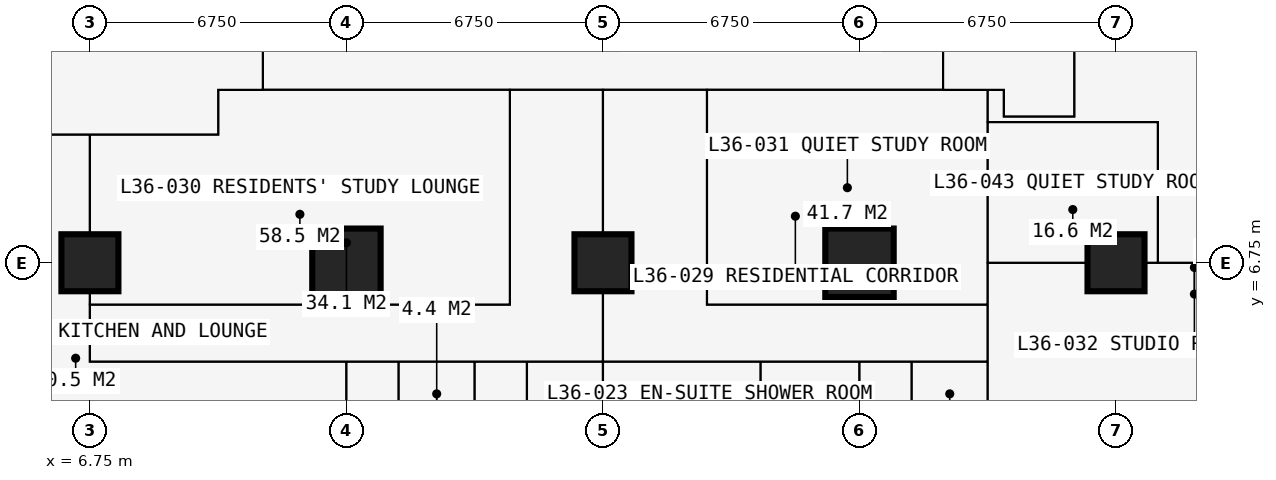
"""IFC4 building model, lengths in metres.
Left out: names, types, materials, properties, quantities, classifications, styles, units other than length and angle.
Written with IfcOpenShell. Run it as: python <this file> out.ifc"""

import sys

from ifc_helpers import new_model, si_unit, direction, frame, frame_2d, origin, origin_2d, place, context, subcontext, project, spatial, rectangle, extrude, element, fill, save


model = new_model("IFC4")
c1 = context("Model", 3, precision=1e-05, world=origin(), true_north=direction((0.0, 1.0)))
c2 = subcontext(c1, "Body", "Model", "MODEL_VIEW")
j1 = project(units=[si_unit("LENGTHUNIT", "METRE"), si_unit("PLANEANGLEUNIT", "RADIAN")], contexts=[c1])
p1 = place(None, origin())
s1 = spatial("IfcSite", under=j1, at=p1, CompositionType="ELEMENT")
p2 = place(p1, origin())
s2 = spatial("IfcBuilding", under=s1, at=p2, CompositionType="ELEMENT")
p3 = place(p2, frame((0.0, 0.0, 134.1)))
s3 = spatial("IfcBuildingStorey", under=s2, at=p3, CompositionType="ELEMENT", Elevation=134.1)
p4 = place(p3, frame((6.75, 6.75, 0.0), z_axis=(0.0, 0.0, 1.0), x_axis=(1.0, 0.0, 0.0)))
e1 = element("IfcColumn", 1, at=p4, inside=s3, PredefinedType="COLUMN", context=c2, shape_type="SweptSolid", body=[
    extrude(rectangle(XDim=1.5, YDim=1.5, at=origin_2d()), origin(), (0.0, 0.0, 1.0), 3.6),
])
p5 = place(p3, frame((13.5, 6.75, 0.0), z_axis=(0.0, 0.0, 1.0), x_axis=(1.0, 0.0, 0.0)))
e2 = element("IfcColumn", 2, at=p5, inside=s3, PredefinedType="COLUMN", context=c2, shape_type="SweptSolid", body=[
    extrude(rectangle(XDim=1.8, YDim=1.8, at=origin_2d()), origin(), (0.0, 0.0, 1.0), 3.6),
])
p6 = place(p3, frame((20.25, 6.75, 0.0), z_axis=(0.0, 0.0, 1.0), x_axis=(1.0, 0.0, 0.0)))
e3 = element("IfcColumn", 3, at=p6, inside=s3, PredefinedType="COLUMN", context=c2, shape_type="SweptSolid", body=[
    extrude(rectangle(XDim=1.5, YDim=1.5, at=origin_2d()), origin(), (0.0, 0.0, 1.0), 3.6),
])
p7 = place(p3, frame((27.0, 6.75, 0.0), z_axis=(0.0, 0.0, 1.0), x_axis=(1.0, 0.0, 0.0)))
e4 = element("IfcColumn", 4, at=p7, inside=s3, PredefinedType="COLUMN", context=c2, shape_type="SweptSolid", body=[
    extrude(rectangle(XDim=1.8, YDim=1.8, at=origin_2d()), origin(), (0.0, 0.0, 1.0), 3.6),
])
p8 = place(p3, frame((33.75, 6.75, 0.0), z_axis=(0.0, 0.0, 1.0), x_axis=(1.0, 0.0, 0.0)))
e5 = element("IfcColumn", 5, at=p8, inside=s3, PredefinedType="COLUMN", context=c2, shape_type="SweptSolid", body=[
    extrude(rectangle(XDim=1.5, YDim=1.5, at=origin_2d()), origin(), (0.0, 0.0, 1.0), 3.6),
])
p9 = place(p3, frame((-0.734, 10.125, 0.0), z_axis=(0.0, 0.0, 1.0), x_axis=(1.0, 0.0, 0.0)))
e6 = element("IfcWall", 6, at=p9, inside=s3, PredefinedType="PARTITIONING", context=c2, shape_type="SweptSolid", body=[
    extrude(rectangle(XDim=10.859, YDim=0.15, at=frame_2d((5.429, 0.0))), origin(), (0.0, 0.0, 1.0), 3.3),
])
p10 = place(p3, frame((6.75, 4.15, 0.0), z_axis=(0.0, 0.0, 1.0), x_axis=(0.0, 1.0, 0.0)))
e7 = element("IfcWall", 7, at=p10, inside=s3, PredefinedType="PARTITIONING", context=c2, shape_type="SweptSolid", body=[
    extrude(rectangle(XDim=5.975, YDim=0.15, at=frame_2d((2.988, 0.0))), origin(), (0.0, 0.0, 1.0), 2.802),
])
p11 = place(p3, frame((6.75, 4.15, 0.0), z_axis=(0.0, 0.0, 1.0), x_axis=(1.0, 0.0, 0.0)))
e8 = element("IfcWall", 8, at=p11, inside=s3, PredefinedType="PARTITIONING", context=c2, shape_type="SweptSolid", body=[
    extrude(rectangle(XDim=23.625, YDim=0.1, at=frame_2d((11.812, 0.0))), origin(), (0.0, 0.0, 1.0), 3.3),
])
p12 = place(p11, frame((2.85, 0.0, 0.0)))
e9 = element("IfcOpeningElement", 9, at=p12, cuts=e8, PredefinedType="OPENING", context=c2, shape_type="SweptSolid", body=[
    extrude(rectangle(XDim=1.0, YDim=2.2, at=frame_2d((0.5, 1.1))), frame((0.0, 0.06, 0.0), z_axis=(0.0, -1.0, 0.0), x_axis=(1.0, 0.0, 0.0)), (0.0, 0.0, 1.0), 0.12),
])
p13 = place(p11, frame((6.95, 0.0, 0.0)))
e10 = element("IfcOpeningElement", 10, at=p13, cuts=e8, PredefinedType="OPENING", context=c2, shape_type="SweptSolid", body=[
    extrude(rectangle(XDim=0.95, YDim=2.2, at=frame_2d((0.475, 1.1))), frame((0.0, 0.06, 0.0), z_axis=(0.0, -1.0, 0.0), x_axis=(1.0, 0.0, 0.0)), (0.0, 0.0, 1.0), 0.12),
])
p14 = place(p11, frame((10.375, 0.0, 0.0)))
e11 = element("IfcOpeningElement", 11, at=p14, cuts=e8, PredefinedType="OPENING", context=c2, shape_type="SweptSolid", body=[
    extrude(rectangle(XDim=0.95, YDim=2.2, at=frame_2d((0.475, 1.1))), frame((0.0, 0.06, 0.0), z_axis=(0.0, -1.0, 0.0), x_axis=(1.0, 0.0, 0.0)), (0.0, 0.0, 1.0), 0.12),
])
p15 = place(p11, frame((15.1, 0.0, 0.0)))
e12 = element("IfcOpeningElement", 12, at=p15, cuts=e8, PredefinedType="OPENING", context=c2, shape_type="SweptSolid", body=[
    extrude(rectangle(XDim=0.95, YDim=2.2, at=frame_2d((0.475, 1.1))), frame((0.0, 0.06, 0.0), z_axis=(0.0, -1.0, 0.0), x_axis=(1.0, 0.0, 0.0)), (0.0, 0.0, 1.0), 0.12),
])
p16 = place(p11, frame((20.5, 0.0, 0.0)))
e13 = element("IfcOpeningElement", 13, at=p16, cuts=e8, PredefinedType="OPENING", context=c2, shape_type="SweptSolid", body=[
    extrude(rectangle(XDim=0.95, YDim=2.2, at=frame_2d((0.475, 1.1))), frame((0.0, 0.06, 0.0), z_axis=(0.0, -1.0, 0.0), x_axis=(1.0, 0.0, 0.0)), (0.0, 0.0, 1.0), 0.12),
])
p17 = place(p3, frame((6.75, 5.65, 0.0), z_axis=(0.0, 0.0, 1.0), x_axis=(1.0, 0.0, 0.0)))
e14 = element("IfcWall", 14, at=p17, inside=s3, PredefinedType="PARTITIONING", context=c2, shape_type="SweptSolid", body=[
    extrude(rectangle(XDim=11.05, YDim=0.15, at=frame_2d((5.525, 0.0))), origin(), (0.0, 0.0, 1.0), 3.3),
])
p18 = place(p3, frame((10.125, 10.125, 0.0), z_axis=(0.0, 0.0, 1.0), x_axis=(0.0, 1.0, 0.0)))
e15 = element("IfcWall", 15, at=p18, inside=s3, PredefinedType="PARTITIONING", context=c2, shape_type="SweptSolid", body=[
    extrude(rectangle(XDim=1.175, YDim=0.15, at=frame_2d((0.587, 0.0))), origin(), (0.0, 0.0, 1.0), 3.3),
])
p19 = place(p3, frame((10.125, 11.3, 0.0), z_axis=(0.0, 0.0, 1.0), x_axis=(1.0, 0.0, 0.0)))
e16 = element("IfcWall", 16, at=p19, inside=s3, PredefinedType="PARTITIONING", context=c2, shape_type="SweptSolid", body=[
    extrude(rectangle(XDim=20.675, YDim=0.15, at=frame_2d((10.337, 0.0))), origin(), (0.0, 0.0, 1.0), 3.3),
])
p20 = place(p19, frame((8.375, 0.0, 0.0)))
e17 = element("IfcOpeningElement", 17, at=p20, cuts=e16, PredefinedType="OPENING", context=c2, shape_type="SweptSolid", body=[
    extrude(rectangle(XDim=1.0, YDim=2.2, at=frame_2d((0.5, 1.1))), frame((0.0, 0.085, 0.0), z_axis=(0.0, -1.0, 0.0), x_axis=(1.0, 0.0, 0.0)), (0.0, 0.0, 1.0), 0.17),
])
p21 = place(p19, frame((10.975, 0.0, 0.0)))
e18 = element("IfcOpeningElement", 18, at=p21, cuts=e16, PredefinedType="OPENING", context=c2, shape_type="SweptSolid", body=[
    extrude(rectangle(XDim=1.0, YDim=2.2, at=frame_2d((0.5, 1.1))), frame((0.0, 0.085, 0.0), z_axis=(0.0, -1.0, 0.0), x_axis=(1.0, 0.0, 0.0)), (0.0, 0.0, 1.0), 0.17),
])
p22 = place(p19, frame((3.925, 0.0, 0.0)))
e19 = element("IfcOpeningElement", 19, at=p22, cuts=e16, PredefinedType="OPENING", context=c2, shape_type="SweptSolid", body=[
    extrude(rectangle(XDim=0.95, YDim=2.2, at=frame_2d((0.475, 1.1))), frame((0.0, 0.085, 0.0), z_axis=(0.0, -1.0, 0.0), x_axis=(1.0, 0.0, 0.0)), (0.0, 0.0, 1.0), 0.17),
])
p23 = place(p3, frame((11.3, 11.3, 0.0), z_axis=(0.0, 0.0, 1.0), x_axis=(0.0, 1.0, 0.0)))
e20 = element("IfcWall", 20, at=p23, inside=s3, PredefinedType="PARTITIONING", context=c2, shape_type="SweptSolid", body=[
    extrude(rectangle(XDim=19.3, YDim=0.15, at=frame_2d((9.65, 0.0))), origin(), (0.0, 0.0, 1.0), 3.3),
])
p24 = place(p23, frame((13.525, 0.0, 0.0)))
e21 = element("IfcOpeningElement", 21, at=p24, cuts=e20, PredefinedType="OPENING", context=c2, shape_type="SweptSolid", body=[
    extrude(rectangle(XDim=1.0, YDim=2.2, at=frame_2d((0.5, 1.1))), frame((0.0, 0.085, 0.0), z_axis=(0.0, -1.0, 0.0), x_axis=(1.0, 0.0, 0.0)), (0.0, 0.0, 1.0), 0.17),
])
p25 = place(p23, frame((10.438, 0.0, 0.0)))
e22 = element("IfcOpeningElement", 22, at=p25, cuts=e20, PredefinedType="OPENING", context=c2, shape_type="SweptSolid", body=[
    extrude(rectangle(XDim=1.0, YDim=2.2, at=frame_2d((0.5, 1.1))), frame((0.0, 0.085, 0.0), z_axis=(0.0, -1.0, 0.0), x_axis=(1.0, 0.0, 0.0)), (0.0, 0.0, 1.0), 0.17),
])
p26 = place(p3, frame((13.5, -0.734, 0.0), z_axis=(0.0, 0.0, 1.0), x_axis=(0.0, 1.0, 0.0)))
e23 = element("IfcWall", 23, at=p26, inside=s3, PredefinedType="PARTITIONING", context=c2, shape_type="SweptSolid", body=[
    extrude(rectangle(XDim=4.884, YDim=0.15, at=frame_2d((2.442, 0.0))), origin(), (0.0, 0.0, 1.0), 2.802),
])
p27 = place(p3, frame((14.875, 1.95, 0.0), z_axis=(0.0, 0.0, 1.0), x_axis=(0.0, 1.0, 0.0)))
e24 = element("IfcWall", 24, at=p27, inside=s3, PredefinedType="PARTITIONING", context=c2, shape_type="SweptSolid", body=[
    extrude(rectangle(XDim=2.2, YDim=0.1, at=frame_2d((1.1, 0.0))), origin(), (0.0, 0.0, 1.0), 3.3),
])
p28 = place(p27, frame((0.65, 0.0, 0.0)))
e25 = element("IfcOpeningElement", 25, at=p28, cuts=e24, PredefinedType="OPENING", context=c2, shape_type="SweptSolid", body=[
    extrude(rectangle(XDim=0.9, YDim=2.2, at=frame_2d((0.45, 1.1))), frame((0.0, 0.06, 0.0), z_axis=(0.0, -1.0, 0.0), x_axis=(1.0, 0.0, 0.0)), (0.0, 0.0, 1.0), 0.12),
])
p29 = place(p3, frame((16.875, -0.734, 0.0), z_axis=(0.0, 0.0, 1.0), x_axis=(0.0, 1.0, 0.0)))
e26 = element("IfcWall", 26, at=p29, inside=s3, PredefinedType="PARTITIONING", context=c2, shape_type="SweptSolid", body=[
    extrude(rectangle(XDim=4.884, YDim=0.175, at=frame_2d((2.442, 0.0))), origin(), (0.0, 0.0, 1.0), 3.3),
])
p30 = place(p3, frame((17.8, 5.65, 0.0), z_axis=(0.0, 0.0, 1.0), x_axis=(0.0, 1.0, 0.0)))
e27 = element("IfcWall", 27, at=p30, inside=s3, PredefinedType="PARTITIONING", context=c2, shape_type="SweptSolid", body=[
    extrude(rectangle(XDim=5.65, YDim=0.15, at=frame_2d((2.825, 0.0))), origin(), (0.0, 0.0, 1.0), 3.3),
])
p31 = place(p3, frame((18.25, 1.95, 0.0), z_axis=(0.0, 0.0, 1.0), x_axis=(0.0, 1.0, 0.0)))
e28 = element("IfcWall", 28, at=p31, inside=s3, PredefinedType="PARTITIONING", context=c2, shape_type="SweptSolid", body=[
    extrude(rectangle(XDim=2.2, YDim=0.1, at=frame_2d((1.1, 0.0))), origin(), (0.0, 0.0, 1.0), 3.3),
])
p32 = place(p31, frame((0.65, 0.0, 0.0)))
e29 = element("IfcOpeningElement", 29, at=p32, cuts=e28, PredefinedType="OPENING", context=c2, shape_type="SweptSolid", body=[
    extrude(rectangle(XDim=0.9, YDim=2.2, at=frame_2d((0.45, 1.1))), frame((0.0, 0.06, 0.0), z_axis=(0.0, -1.0, 0.0), x_axis=(1.0, 0.0, 0.0)), (0.0, 0.0, 1.0), 0.12),
])
p33 = place(p3, frame((20.25, -0.734, 0.0), z_axis=(0.0, 0.0, 1.0), x_axis=(0.0, 1.0, 0.0)))
e30 = element("IfcWall", 30, at=p33, inside=s3, PredefinedType="PARTITIONING", context=c2, shape_type="SweptSolid", body=[
    extrude(rectangle(XDim=12.034, YDim=0.15, at=frame_2d((6.017, 0.0))), origin(), (0.0, 0.0, 1.0), 2.802),
])
p34 = place(p3, frame((22.988, 5.65, 0.0), z_axis=(0.0, 0.0, 1.0), x_axis=(1.0, 0.0, 0.0)))
e31 = element("IfcWall", 31, at=p34, inside=s3, PredefinedType="PARTITIONING", context=c2, shape_type="SweptSolid", body=[
    extrude(rectangle(XDim=7.387, YDim=0.15, at=frame_2d((3.694, 0.0))), origin(), (0.0, 0.0, 1.0), 3.3),
])
p35 = place(p34, frame((2.15, 0.0, 0.0)))
e32 = element("IfcOpeningElement", 32, at=p35, cuts=e31, PredefinedType="OPENING", context=c2, shape_type="SweptSolid", body=[
    extrude(rectangle(XDim=0.95, YDim=2.2, at=frame_2d((0.475, 1.1))), frame((0.0, 0.085, 0.0), z_axis=(0.0, -1.0, 0.0), x_axis=(1.0, 0.0, 0.0)), (0.0, 0.0, 1.0), 0.17),
])
p36 = place(p3, frame((22.988, 5.65, 0.0), z_axis=(0.0, 0.0, 1.0), x_axis=(0.0, 1.0, 0.0)))
e33 = element("IfcWall", 33, at=p36, inside=s3, PredefinedType="PARTITIONING", context=c2, shape_type="SweptSolid", body=[
    extrude(rectangle(XDim=5.65, YDim=0.15, at=frame_2d((2.825, 0.0))), origin(), (0.0, 0.0, 1.0), 3.3),
])
p37 = place(p3, frame((24.4, 1.75, 0.0), z_axis=(0.0, 0.0, 1.0), x_axis=(0.0, 1.0, 0.0)))
e34 = element("IfcWall", 34, at=p37, inside=s3, PredefinedType="PARTITIONING", context=c2, shape_type="SweptSolid", body=[
    extrude(rectangle(XDim=2.4, YDim=0.1, at=frame_2d((1.2, 0.0))), origin(), (0.0, 0.0, 1.0), 3.3),
])
p38 = place(p3, frame((27.0, -0.734, 0.0), z_axis=(0.0, 0.0, 1.0), x_axis=(0.0, 1.0, 0.0)))
e35 = element("IfcWall", 35, at=p38, inside=s3, PredefinedType="PARTITIONING", context=c2, shape_type="SweptSolid", body=[
    extrude(rectangle(XDim=4.884, YDim=0.175, at=frame_2d((2.442, 0.0))), origin(), (0.0, 0.0, 1.0), 2.802),
])
p39 = place(p3, frame((28.375, 1.95, 0.0), z_axis=(0.0, 0.0, 1.0), x_axis=(0.0, 1.0, 0.0)))
e36 = element("IfcWall", 36, at=p39, inside=s3, PredefinedType="PARTITIONING", context=c2, shape_type="SweptSolid", body=[
    extrude(rectangle(XDim=2.2, YDim=0.1, at=frame_2d((1.1, 0.0))), origin(), (0.0, 0.0, 1.0), 3.3),
])
p40 = place(p39, frame((0.65, 0.0, 0.0)))
e37 = element("IfcOpeningElement", 37, at=p40, cuts=e36, PredefinedType="OPENING", context=c2, shape_type="SweptSolid", body=[
    extrude(rectangle(XDim=0.9, YDim=2.2, at=frame_2d((0.45, 1.1))), frame((0.0, 0.06, 0.0), z_axis=(0.0, -1.0, 0.0), x_axis=(1.0, 0.0, 0.0)), (0.0, 0.0, 1.0), 0.12),
])
p41 = place(p3, frame((29.2, 11.3, 0.0), z_axis=(0.0, 0.0, 1.0), x_axis=(0.0, 1.0, 0.0)))
e38 = element("IfcWall", 38, at=p41, inside=s3, PredefinedType="PARTITIONING", context=c2, shape_type="SweptSolid", body=[
    extrude(rectangle(XDim=17.9, YDim=0.2, at=frame_2d((8.95, 0.0))), origin(), (0.0, 0.0, 1.0), 3.3),
])
p42 = place(p41, frame((8.35, 0.0, 0.0)))
e39 = element("IfcOpeningElement", 39, at=p42, cuts=e38, PredefinedType="OPENING", context=c2, shape_type="SweptSolid", body=[
    extrude(rectangle(XDim=1.2, YDim=2.2, at=frame_2d((0.6, 1.1))), frame((0.0, 0.11, 0.0), z_axis=(0.0, -1.0, 0.0), x_axis=(1.0, 0.0, 0.0)), (0.0, 0.0, 1.0), 0.22),
])
p43 = place(p3, frame((30.375, -0.734, 0.0), z_axis=(0.0, 0.0, 1.0), x_axis=(0.0, 1.0, 0.0)))
e40 = element("IfcWall", 40, at=p43, inside=s3, PredefinedType="PARTITIONING", context=c2, shape_type="SweptSolid", body=[
    extrude(rectangle(XDim=12.034, YDim=0.15, at=frame_2d((6.017, 0.0))), origin(), (0.0, 0.0, 1.0), 3.3),
])
p44 = place(p43, frame((5.134, 0.0, 0.0)))
e41 = element("IfcOpeningElement", 41, at=p44, cuts=e40, PredefinedType="OPENING", context=c2, shape_type="SweptSolid", body=[
    extrude(rectangle(XDim=1.0, YDim=2.2, at=frame_2d((0.5, 1.1))), frame((0.0, 0.085, 0.0), z_axis=(0.0, -1.0, 0.0), x_axis=(1.0, 0.0, 0.0)), (0.0, 0.0, 1.0), 0.17),
])
p45 = place(p3, frame((30.375, 6.75, 0.0), z_axis=(0.0, 0.0, 1.0), x_axis=(1.0, 0.0, 0.0)))
e42 = element("IfcWall", 42, at=p45, inside=s3, PredefinedType="PARTITIONING", context=c2, shape_type="SweptSolid", body=[
    extrude(rectangle(XDim=5.975, YDim=0.15, at=frame_2d((2.988, 0.0))), origin(), (0.0, 0.0, 1.0), 2.802),
])
p46 = place(p3, frame((30.375, 10.45, 0.0), z_axis=(0.0, 0.0, 1.0), x_axis=(1.0, 0.0, 0.0)))
e43 = element("IfcWall", 43, at=p46, inside=s3, PredefinedType="PARTITIONING", context=c2, shape_type="SweptSolid", body=[
    extrude(rectangle(XDim=4.475, YDim=0.15, at=frame_2d((2.238, 0.0))), origin(), (0.0, 0.0, 1.0), 3.3),
])
p47 = place(p46, frame((2.35, 0.0, 0.0)))
e44 = element("IfcOpeningElement", 44, at=p47, cuts=e43, PredefinedType="OPENING", context=c2, shape_type="SweptSolid", body=[
    extrude(rectangle(XDim=0.95, YDim=2.2, at=frame_2d((0.475, 1.1))), frame((0.0, 0.085, 0.0), z_axis=(0.0, -1.0, 0.0), x_axis=(1.0, 0.0, 0.0)), (0.0, 0.0, 1.0), 0.17),
])
p48 = place(p3, frame((30.8, 10.6, 0.0), z_axis=(0.0, 0.0, 1.0), x_axis=(0.0, 1.0, 0.0)))
e45 = element("IfcWall", 45, at=p48, inside=s3, PredefinedType="PARTITIONING", context=c2, shape_type="SweptSolid", body=[
    extrude(rectangle(XDim=0.7, YDim=0.15, at=frame_2d((0.35, 0.0))), origin(), (0.0, 0.0, 1.0), 3.3),
])
p49 = place(p3, frame((30.8, 10.6, 0.0), z_axis=(0.0, 0.0, 1.0), x_axis=(1.0, 0.0, 0.0)))
e46 = element("IfcWall", 46, at=p49, inside=s3, PredefinedType="PARTITIONING", context=c2, shape_type="SweptSolid", body=[
    extrude(rectangle(XDim=1.85, YDim=0.15, at=frame_2d((0.925, 0.0))), origin(), (0.0, 0.0, 1.0), 3.3),
])
p50 = place(p3, frame((32.65, 10.6, 0.0), z_axis=(0.0, 0.0, 1.0), x_axis=(0.0, 1.0, 0.0)))
e47 = element("IfcWall", 47, at=p50, inside=s3, PredefinedType="SHEAR", context=c2, shape_type="SweptSolid", body=[
    extrude(rectangle(XDim=9.3, YDim=0.1, at=frame_2d((4.65, 0.0))), origin(), (0.0, 0.0, 1.0), 3.3),
])
p51 = place(p50, frame((0.5, 0.0, 0.0)))
e48 = element("IfcOpeningElement", 48, at=p51, cuts=e47, PredefinedType="OPENING", context=c2, shape_type="SweptSolid", body=[
    extrude(rectangle(XDim=1.0, YDim=2.2, at=frame_2d((0.5, 1.1))), frame((0.0, 0.06, 0.0), z_axis=(0.0, -1.0, 0.0), x_axis=(1.0, 0.0, 0.0)), (0.0, 0.0, 1.0), 0.12),
])
p52 = place(p3, frame((34.85, 6.75, 0.0), z_axis=(0.0, 0.0, 1.0), x_axis=(0.0, 1.0, 0.0)))
e49 = element("IfcWall", 49, at=p52, inside=s3, PredefinedType="PARTITIONING", context=c2, shape_type="SweptSolid", body=[
    extrude(rectangle(XDim=3.7, YDim=0.15, at=frame_2d((1.85, 0.0))), origin(), (0.0, 0.0, 1.0), 3.3),
])
p53 = place(p12, origin())
e50 = element("IfcDoor", 50, at=p53, inside=s3, OperationType="SINGLE_SWING_LEFT", PredefinedType="DOOR", context=c2, shape_type="SweptSolid", body=[
    extrude(rectangle(XDim=1.0, YDim=2.2, at=frame_2d((0.5, 1.1))), frame((0.0, 0.025, 0.0), z_axis=(0.0, -1.0, 0.0), x_axis=(1.0, 0.0, 0.0)), (0.0, 0.0, 1.0), 0.05),
])
fill(e9, e50)
p54 = place(p13, origin())
e51 = element("IfcDoor", 51, at=p54, inside=s3, OperationType="SINGLE_SWING_LEFT", PredefinedType="DOOR", context=c2, shape_type="SweptSolid", body=[
    extrude(rectangle(XDim=0.95, YDim=2.2, at=frame_2d((0.475, 1.1))), frame((0.0, 0.025, 0.0), z_axis=(0.0, -1.0, 0.0), x_axis=(1.0, 0.0, 0.0)), (0.0, 0.0, 1.0), 0.05),
])
fill(e10, e51)
p55 = place(p28, origin())
e52 = element("IfcDoor", 52, at=p55, inside=s3, OperationType="SINGLE_SWING_RIGHT", PredefinedType="DOOR", context=c2, shape_type="SweptSolid", body=[
    extrude(rectangle(XDim=0.9, YDim=2.2, at=frame_2d((0.45, 1.1))), frame((0.0, 0.025, 0.0), z_axis=(0.0, -1.0, 0.0), x_axis=(1.0, 0.0, 0.0)), (0.0, 0.0, 1.0), 0.05),
])
fill(e25, e52)
p56 = place(p14, origin())
e53 = element("IfcDoor", 53, at=p56, inside=s3, OperationType="SINGLE_SWING_LEFT", PredefinedType="DOOR", context=c2, shape_type="SweptSolid", body=[
    extrude(rectangle(XDim=0.95, YDim=2.2, at=frame_2d((0.475, 1.1))), frame((0.0, 0.025, 0.0), z_axis=(0.0, -1.0, 0.0), x_axis=(1.0, 0.0, 0.0)), (0.0, 0.0, 1.0), 0.05),
])
fill(e11, e53)
p57 = place(p32, origin())
e54 = element("IfcDoor", 54, at=p57, inside=s3, OperationType="SINGLE_SWING_RIGHT", PredefinedType="DOOR", context=c2, shape_type="SweptSolid", body=[
    extrude(rectangle(XDim=0.9, YDim=2.2, at=frame_2d((0.45, 1.1))), frame((0.0, 0.025, 0.0), z_axis=(0.0, -1.0, 0.0), x_axis=(1.0, 0.0, 0.0)), (0.0, 0.0, 1.0), 0.05),
])
fill(e29, e54)
p58 = place(p20, origin())
e55 = element("IfcDoor", 55, at=p58, inside=s3, OperationType="SINGLE_SWING_LEFT", PredefinedType="DOOR", context=c2, shape_type="SweptSolid", body=[
    extrude(rectangle(XDim=1.0, YDim=2.2, at=frame_2d((0.5, 1.1))), frame((0.0, 0.025, 0.0), z_axis=(0.0, -1.0, 0.0), x_axis=(1.0, 0.0, 0.0)), (0.0, 0.0, 1.0), 0.05),
])
fill(e17, e55)
p59 = place(p15, origin())
e56 = element("IfcDoor", 56, at=p59, inside=s3, OperationType="SINGLE_SWING_LEFT", PredefinedType="DOOR", context=c2, shape_type="SweptSolid", body=[
    extrude(rectangle(XDim=0.95, YDim=2.2, at=frame_2d((0.475, 1.1))), frame((0.0, 0.025, 0.0), z_axis=(0.0, -1.0, 0.0), x_axis=(1.0, 0.0, 0.0)), (0.0, 0.0, 1.0), 0.05),
])
fill(e12, e56)
p60 = place(p16, origin())
e57 = element("IfcDoor", 57, at=p60, inside=s3, OperationType="SINGLE_SWING_LEFT", PredefinedType="DOOR", context=c2, shape_type="SweptSolid", body=[
    extrude(rectangle(XDim=0.95, YDim=2.2, at=frame_2d((0.475, 1.1))), frame((0.0, 0.025, 0.0), z_axis=(0.0, -1.0, 0.0), x_axis=(1.0, 0.0, 0.0)), (0.0, 0.0, 1.0), 0.05),
])
fill(e13, e57)
p61 = place(p40, origin())
e58 = element("IfcDoor", 58, at=p61, inside=s3, OperationType="SINGLE_SWING_RIGHT", PredefinedType="DOOR", context=c2, shape_type="SweptSolid", body=[
    extrude(rectangle(XDim=0.9, YDim=2.2, at=frame_2d((0.45, 1.1))), frame((0.0, 0.025, 0.0), z_axis=(0.0, -1.0, 0.0), x_axis=(1.0, 0.0, 0.0)), (0.0, 0.0, 1.0), 0.05),
])
fill(e37, e58)
p62 = place(p21, origin())
e59 = element("IfcDoor", 59, at=p62, inside=s3, OperationType="SINGLE_SWING_LEFT", PredefinedType="DOOR", context=c2, shape_type="SweptSolid", body=[
    extrude(rectangle(XDim=1.0, YDim=2.2, at=frame_2d((0.5, 1.1))), frame((0.0, 0.025, 0.0), z_axis=(0.0, -1.0, 0.0), x_axis=(1.0, 0.0, 0.0)), (0.0, 0.0, 1.0), 0.05),
])
fill(e18, e59)
p63 = place(p22, origin())
e60 = element("IfcDoor", 60, at=p63, inside=s3, OperationType="SINGLE_SWING_LEFT", PredefinedType="DOOR", context=c2, shape_type="SweptSolid", body=[
    extrude(rectangle(XDim=0.95, YDim=2.2, at=frame_2d((0.475, 1.1))), frame((0.0, 0.025, 0.0), z_axis=(0.0, -1.0, 0.0), x_axis=(1.0, 0.0, 0.0)), (0.0, 0.0, 1.0), 0.05),
])
fill(e19, e60)
p64 = place(p35, origin())
e61 = element("IfcDoor", 61, at=p64, inside=s3, OperationType="SINGLE_SWING_LEFT", PredefinedType="DOOR", context=c2, shape_type="SweptSolid", body=[
    extrude(rectangle(XDim=0.95, YDim=2.2, at=frame_2d((0.475, 1.1))), frame((0.0, 0.025, 0.0), z_axis=(0.0, -1.0, 0.0), x_axis=(1.0, 0.0, 0.0)), (0.0, 0.0, 1.0), 0.05),
])
fill(e32, e61)
p65 = place(p44, origin())
e62 = element("IfcDoor", 62, at=p65, inside=s3, OperationType="SINGLE_SWING_LEFT", PredefinedType="DOOR", context=c2, shape_type="SweptSolid", body=[
    extrude(rectangle(XDim=1.0, YDim=2.2, at=frame_2d((0.5, 1.1))), frame((0.0, 0.025, 0.0), z_axis=(0.0, -1.0, 0.0), x_axis=(1.0, 0.0, 0.0)), (0.0, 0.0, 1.0), 0.05),
])
fill(e41, e62)
p66 = place(p51, origin())
e63 = element("IfcDoor", 63, at=p66, inside=s3, OperationType="SINGLE_SWING_LEFT", PredefinedType="DOOR", context=c2, shape_type="SweptSolid", body=[
    extrude(rectangle(XDim=1.0, YDim=2.2, at=frame_2d((0.5, 1.1))), frame((0.0, 0.025, 0.0), z_axis=(0.0, -1.0, 0.0), x_axis=(1.0, 0.0, 0.0)), (0.0, 0.0, 1.0), 0.05),
])
fill(e48, e63)
p67 = place(p47, origin())
e64 = element("IfcDoor", 64, at=p67, inside=s3, OperationType="SINGLE_SWING_LEFT", PredefinedType="DOOR", context=c2, shape_type="SweptSolid", body=[
    extrude(rectangle(XDim=0.95, YDim=2.2, at=frame_2d((0.475, 1.1))), frame((0.0, 0.025, 0.0), z_axis=(0.0, -1.0, 0.0), x_axis=(1.0, 0.0, 0.0)), (0.0, 0.0, 1.0), 0.05),
])
fill(e44, e64)
save(model, sys.argv[1])
